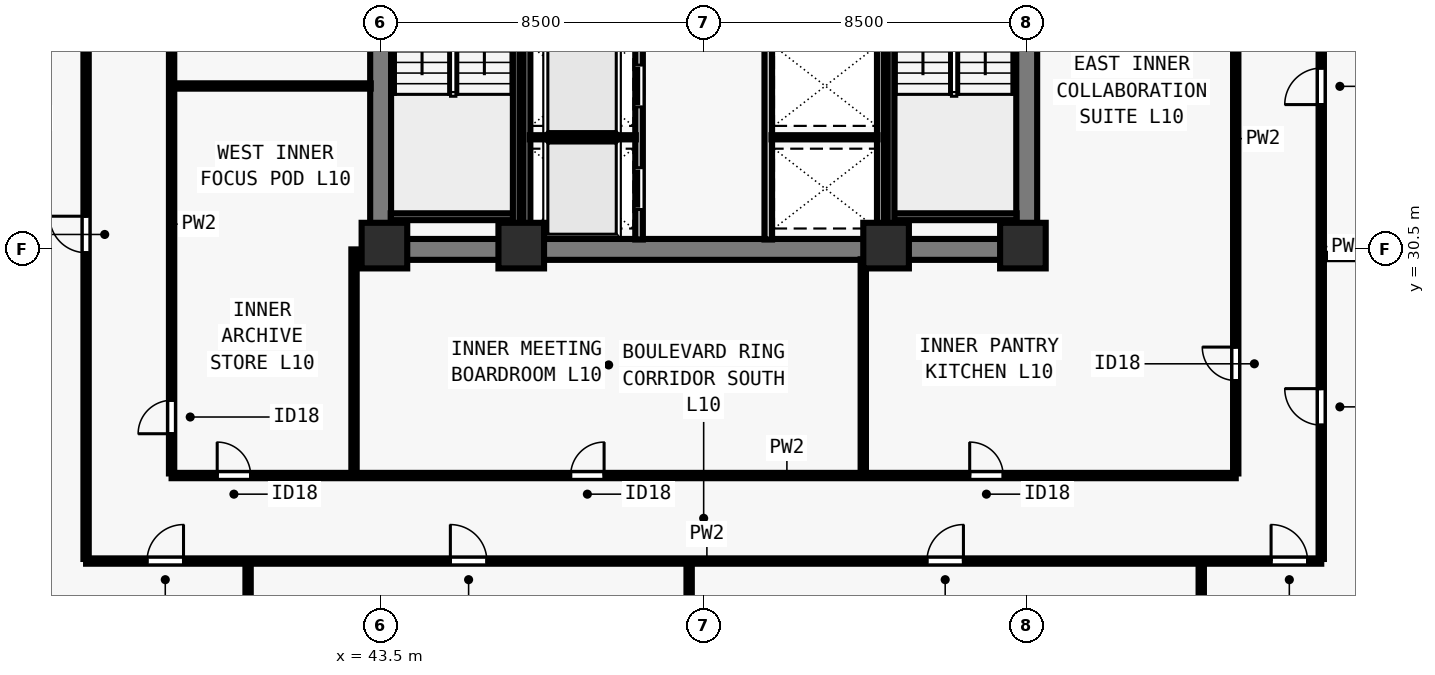
"""IFC4 building model, lengths in metres.
Left out: names, types, materials, properties, quantities, classifications, styles, units other than length and angle.
Written with IfcOpenShell. Run it as: python <this file> out.ifc"""

import sys

from ifc_helpers import new_model, si_unit, direction, frame, frame_2d, origin, origin_2d, place, context, subcontext, project, spatial, rectangle, extrude, element, fill, save


model = new_model("IFC4")
c1 = context("Model", 3, precision=1e-05, world=origin(), true_north=direction((0.0, 1.0)))
c2 = subcontext(c1, "Body", "Model", "MODEL_VIEW")
j1 = project(units=[si_unit("LENGTHUNIT", "METRE"), si_unit("PLANEANGLEUNIT", "RADIAN")], contexts=[c1])
p1 = place(None, origin())
s1 = spatial("IfcSite", under=j1, at=p1, CompositionType="ELEMENT")
p2 = place(p1, origin())
s2 = spatial("IfcBuilding", under=s1, at=p2, CompositionType="ELEMENT")
p3 = place(p2, frame((0.0, 0.0, 41.0)))
s3 = spatial("IfcBuildingStorey", under=s2, at=p3, CompositionType="ELEMENT", Elevation=41.0)
for number, where, z_axis, x_axis in (
    (1, (43.6, 30.6, 0.0), (0.0, 0.0, 1.0), (1.0, 0.0, 0.0)),
    (2, (47.2, 30.6, 0.0), (0.0, 0.0, 1.0), (1.0, 0.0, 0.0)),
    (3, (56.8, 30.6, 0.0), (0.0, 0.0, 1.0), (1.0, 0.0, 0.0)),
    (4, (60.4, 30.6, 0.0), (0.0, 0.0, 1.0), (1.0, 0.0, 0.0)),
):
    element("IfcColumn", number, at=place(p3, frame(where, z_axis=z_axis, x_axis=x_axis)), inside=s3, PredefinedType="COLUMN", context=c2, shape_type="SweptSolid", body=[
        extrude(rectangle(XDim=1.2, YDim=1.2, at=origin_2d()), origin(), (0.0, 0.0, 1.0), 3.5),
    ])
p4 = place(p3, frame((43.225, 30.5, 0.0), z_axis=(0.0, 0.0, 1.0), x_axis=(1.0, 0.0, 0.0)))
e5 = element("IfcWall", 5, at=p4, inside=s3, PredefinedType="SHEAR", context=c2, shape_type="SweptSolid", body=[
    extrude(rectangle(XDim=17.55, YDim=0.55, at=frame_2d((8.775, 0.0))), origin(), (0.0, 0.0, 1.0), 3.28),
])
for number, where, z_axis, x_axis in (
    (6, (43.5, 30.765, 0.0), (0.0, 0.0, 1.0), (0.0, 1.0, 0.0)),
    (7, (60.5, 30.765, 0.0), (0.0, 0.0, 1.0), (0.0, 1.0, 0.0)),
):
    element("IfcWall", number, at=place(p3, frame(where, z_axis=z_axis, x_axis=x_axis)), inside=s3, PredefinedType="SHEAR", context=c2, shape_type="SweptSolid", body=[
        extrude(rectangle(XDim=7.985, YDim=0.55, at=frame_2d((3.993, 0.0))), origin(), (0.0, 0.0, 1.0), 3.28),
    ])
p5 = place(p3, frame((50.3, 30.76, 0.0), z_axis=(0.0, 0.0, 1.0), x_axis=(0.0, 1.0, 0.0)))
e8 = element("IfcWall", 8, at=p5, inside=s3, PredefinedType="SOLIDWALL", context=c2, shape_type="SweptSolid", body=[
    extrude(rectangle(XDim=7.855, YDim=0.2, at=frame_2d((3.927, 0.0))), origin(), (0.0, 0.0, 1.0), 3.28),
])
p6 = place(p5, frame((0.79, 0.0, 0.0)))
e9 = element("IfcOpeningElement", 9, at=p6, cuts=e8, PredefinedType="OPENING", context=c2, shape_type="SweptSolid", body=[
    extrude(rectangle(XDim=1.1, YDim=2.2, at=frame_2d((0.55, 1.1))), frame((0.0, 0.11, 0.0), z_axis=(0.0, -1.0, 0.0), x_axis=(1.0, 0.0, 0.0)), (0.0, 0.0, 1.0), 0.22),
])
p7 = place(p5, frame((3.49, 0.0, 0.0)))
e10 = element("IfcOpeningElement", 10, at=p7, cuts=e8, PredefinedType="OPENING", context=c2, shape_type="SweptSolid", body=[
    extrude(rectangle(XDim=1.1, YDim=2.2, at=frame_2d((0.55, 1.1))), frame((0.0, 0.11, 0.0), z_axis=(0.0, -1.0, 0.0), x_axis=(1.0, 0.0, 0.0)), (0.0, 0.0, 1.0), 0.22),
])
p8 = place(p5, frame((6.19, 0.0, 0.0)))
e11 = element("IfcOpeningElement", 11, at=p8, cuts=e8, PredefinedType="OPENING", context=c2, shape_type="SweptSolid", body=[
    extrude(rectangle(XDim=1.1, YDim=2.2, at=frame_2d((0.55, 1.1))), frame((0.0, 0.11, 0.0), z_axis=(0.0, -1.0, 0.0), x_axis=(1.0, 0.0, 0.0)), (0.0, 0.0, 1.0), 0.22),
])
p9 = place(p3, frame((53.7, 30.76, 0.0), z_axis=(0.0, 0.0, 1.0), x_axis=(0.0, 1.0, 0.0)))
e12 = element("IfcWall", 12, at=p9, inside=s3, PredefinedType="SOLIDWALL", context=c2, shape_type="SweptSolid", body=[
    extrude(rectangle(XDim=7.855, YDim=0.2, at=frame_2d((3.927, 0.0))), origin(), (0.0, 0.0, 1.0), 3.28),
])
p10 = place(p3, frame((47.35, 30.76, 0.0), z_axis=(0.0, 0.0, 1.0), x_axis=(0.0, 1.0, 0.0)))
e13 = element("IfcWall", 13, at=p10, inside=s3, PredefinedType="SOLIDWALL", context=c2, shape_type="SweptSolid", body=[
    extrude(rectangle(XDim=7.855, YDim=0.18, at=frame_2d((3.927, 0.0))), origin(), (0.0, 0.0, 1.0), 3.28),
])
p11 = place(p3, frame((47.425, 33.45, 0.0), z_axis=(0.0, 0.0, 1.0), x_axis=(1.0, 0.0, 0.0)))
e14 = element("IfcWall", 14, at=p11, inside=s3, PredefinedType="PARTITIONING", context=c2, shape_type="SweptSolid", body=[
    extrude(rectangle(XDim=2.79, YDim=0.11, at=frame_2d((1.395, 0.0))), origin(), (0.0, 0.0, 1.0), 3.28),
])
p12 = place(p3, frame((56.65, 30.76, 0.0), z_axis=(0.0, 0.0, 1.0), x_axis=(0.0, 1.0, 0.0)))
e15 = element("IfcWall", 15, at=p12, inside=s3, PredefinedType="SOLIDWALL", context=c2, shape_type="SweptSolid", body=[
    extrude(rectangle(XDim=7.855, YDim=0.18, at=frame_2d((3.927, 0.0))), origin(), (0.0, 0.0, 1.0), 3.28),
])
p13 = place(p3, frame((53.785, 33.45, 0.0), z_axis=(0.0, 0.0, 1.0), x_axis=(1.0, 0.0, 0.0)))
e16 = element("IfcWall", 16, at=p13, inside=s3, PredefinedType="PARTITIONING", context=c2, shape_type="SweptSolid", body=[
    extrude(rectangle(XDim=2.79, YDim=0.11, at=frame_2d((1.395, 0.0))), origin(), (0.0, 0.0, 1.0), 3.28),
])
p14 = place(p3, frame((35.75, 22.3, 0.0), z_axis=(0.0, 0.0, 1.0), x_axis=(1.0, 0.0, 0.0)))
e17 = element("IfcWall", 17, at=p14, inside=s3, PredefinedType="PARTITIONING", context=c2, shape_type="SweptSolid", body=[
    extrude(rectangle(XDim=32.5, YDim=0.14, at=frame_2d((16.25, 0.0))), origin(), (0.0, 0.0, 1.0), 3.28),
])
p15 = place(p14, frame((1.604, 0.0, 0.0)))
e18 = element("IfcOpeningElement", 18, at=p15, cuts=e17, PredefinedType="OPENING", context=c2, shape_type="SweptSolid", body=[
    extrude(rectangle(XDim=0.96, YDim=2.12, at=frame_2d((0.48, 1.06))), frame((0.0, 0.08, 0.0), z_axis=(0.0, -1.0, 0.0), x_axis=(1.0, 0.0, 0.0)), (0.0, 0.0, 1.0), 0.16),
])
p16 = place(p14, frame((9.585, 0.0, 0.0)))
e19 = element("IfcOpeningElement", 19, at=p16, cuts=e17, PredefinedType="OPENING", context=c2, shape_type="SweptSolid", body=[
    extrude(rectangle(XDim=0.96, YDim=2.12, at=frame_2d((0.48, 1.06))), frame((0.0, 0.08, 0.0), z_axis=(0.0, -1.0, 0.0), x_axis=(1.0, 0.0, 0.0)), (0.0, 0.0, 1.0), 0.16),
])
p17 = place(p14, frame((22.125, 0.0, 0.0)))
e20 = element("IfcOpeningElement", 20, at=p17, cuts=e17, PredefinedType="OPENING", context=c2, shape_type="SweptSolid", body=[
    extrude(rectangle(XDim=0.96, YDim=2.12, at=frame_2d((0.48, 1.06))), frame((0.0, 0.08, 0.0), z_axis=(0.0, -1.0, 0.0), x_axis=(1.0, 0.0, 0.0)), (0.0, 0.0, 1.0), 0.16),
])
p18 = place(p14, frame((31.18, 0.0, 0.0)))
e21 = element("IfcOpeningElement", 21, at=p18, cuts=e17, PredefinedType="OPENING", context=c2, shape_type="SweptSolid", body=[
    extrude(rectangle(XDim=0.96, YDim=2.12, at=frame_2d((0.48, 1.06))), frame((0.0, 0.08, 0.0), z_axis=(0.0, -1.0, 0.0), x_axis=(1.0, 0.0, 0.0)), (0.0, 0.0, 1.0), 0.16),
])
p19 = place(p3, frame((35.75, 22.355, 0.0), z_axis=(0.0, 0.0, 1.0), x_axis=(0.0, 1.0, 0.0)))
e22 = element("IfcWall", 22, at=p19, inside=s3, PredefinedType="PARTITIONING", context=c2, shape_type="SweptSolid", body=[
    extrude(rectangle(XDim=33.29, YDim=0.14, at=frame_2d((16.645, 0.0))), origin(), (0.0, 0.0, 1.0), 3.28),
])
p20 = place(p19, frame((8.058, 0.0, 0.0)))
e23 = element("IfcOpeningElement", 23, at=p20, cuts=e22, PredefinedType="OPENING", context=c2, shape_type="SweptSolid", body=[
    extrude(rectangle(XDim=0.96, YDim=2.12, at=frame_2d((0.48, 1.06))), frame((0.0, 0.08, 0.0), z_axis=(0.0, -1.0, 0.0), x_axis=(1.0, 0.0, 0.0)), (0.0, 0.0, 1.0), 0.16),
])
p21 = place(p19, frame((24.658, 0.0, 0.0)))
e24 = element("IfcOpeningElement", 24, at=p21, cuts=e22, PredefinedType="OPENING", context=c2, shape_type="SweptSolid", body=[
    extrude(rectangle(XDim=0.96, YDim=2.12, at=frame_2d((0.48, 1.06))), frame((0.0, 0.08, 0.0), z_axis=(0.0, -1.0, 0.0), x_axis=(1.0, 0.0, 0.0)), (0.0, 0.0, 1.0), 0.16),
])
p22 = place(p3, frame((68.25, 22.355, 0.0), z_axis=(0.0, 0.0, 1.0), x_axis=(0.0, 1.0, 0.0)))
e25 = element("IfcWall", 25, at=p22, inside=s3, PredefinedType="PARTITIONING", context=c2, shape_type="SweptSolid", body=[
    extrude(rectangle(XDim=33.29, YDim=0.14, at=frame_2d((16.645, 0.0))), origin(), (0.0, 0.0, 1.0), 3.28),
])
p23 = place(p22, frame((3.522, 0.0, 0.0)))
e26 = element("IfcOpeningElement", 26, at=p23, cuts=e25, PredefinedType="OPENING", context=c2, shape_type="SweptSolid", body=[
    extrude(rectangle(XDim=0.96, YDim=2.12, at=frame_2d((0.48, 1.06))), frame((0.0, 0.08, 0.0), z_axis=(0.0, -1.0, 0.0), x_axis=(1.0, 0.0, 0.0)), (0.0, 0.0, 1.0), 0.16),
])
p24 = place(p22, frame((11.956, 0.0, 0.0)))
e27 = element("IfcOpeningElement", 27, at=p24, cuts=e25, PredefinedType="OPENING", context=c2, shape_type="SweptSolid", body=[
    extrude(rectangle(XDim=0.96, YDim=2.12, at=frame_2d((0.48, 1.06))), frame((0.0, 0.08, 0.0), z_axis=(0.0, -1.0, 0.0), x_axis=(1.0, 0.0, 0.0)), (0.0, 0.0, 1.0), 0.16),
])
p25 = place(p22, frame((20.256, 0.0, 0.0)))
e28 = element("IfcOpeningElement", 28, at=p25, cuts=e25, PredefinedType="OPENING", context=c2, shape_type="SweptSolid", body=[
    extrude(rectangle(XDim=0.96, YDim=2.12, at=frame_2d((0.48, 1.06))), frame((0.0, 0.08, 0.0), z_axis=(0.0, -1.0, 0.0), x_axis=(1.0, 0.0, 0.0)), (0.0, 0.0, 1.0), 0.16),
])
p26 = place(p22, frame((28.422, 0.0, 0.0)))
e29 = element("IfcOpeningElement", 29, at=p26, cuts=e25, PredefinedType="OPENING", context=c2, shape_type="SweptSolid", body=[
    extrude(rectangle(XDim=0.96, YDim=2.12, at=frame_2d((0.48, 1.06))), frame((0.0, 0.08, 0.0), z_axis=(0.0, -1.0, 0.0), x_axis=(1.0, 0.0, 0.0)), (0.0, 0.0, 1.0), 0.16),
])
p27 = place(p3, frame((38.0, 24.55, 0.0), z_axis=(0.0, 0.0, 1.0), x_axis=(1.0, 0.0, 0.0)))
e30 = element("IfcWall", 30, at=p27, inside=s3, PredefinedType="PARTITIONING", context=c2, shape_type="SweptSolid", body=[
    extrude(rectangle(XDim=28.0, YDim=0.14, at=frame_2d((14.0, 0.0))), origin(), (0.0, 0.0, 1.0), 3.28),
])
p28 = place(p27, frame((1.2, 0.0, 0.0)))
e31 = element("IfcOpeningElement", 31, at=p28, cuts=e30, PredefinedType="OPENING", context=c2, shape_type="SweptSolid", body=[
    extrude(rectangle(XDim=0.88, YDim=2.1, at=frame_2d((0.44, 1.05))), frame((0.0, 0.08, 0.0), z_axis=(0.0, -1.0, 0.0), x_axis=(1.0, 0.0, 0.0)), (0.0, 0.0, 1.0), 0.16),
])
p29 = place(p27, frame((10.5, 0.0, 0.0)))
e32 = element("IfcOpeningElement", 32, at=p29, cuts=e30, PredefinedType="OPENING", context=c2, shape_type="SweptSolid", body=[
    extrude(rectangle(XDim=0.88, YDim=2.1, at=frame_2d((0.44, 1.05))), frame((0.0, 0.08, 0.0), z_axis=(0.0, -1.0, 0.0), x_axis=(1.0, 0.0, 0.0)), (0.0, 0.0, 1.0), 0.16),
])
p30 = place(p27, frame((21.0, 0.0, 0.0)))
e33 = element("IfcOpeningElement", 33, at=p30, cuts=e30, PredefinedType="OPENING", context=c2, shape_type="SweptSolid", body=[
    extrude(rectangle(XDim=0.88, YDim=2.1, at=frame_2d((0.44, 1.05))), frame((0.0, 0.08, 0.0), z_axis=(0.0, -1.0, 0.0), x_axis=(1.0, 0.0, 0.0)), (0.0, 0.0, 1.0), 0.16),
])
p31 = place(p3, frame((38.0, 24.605, 0.0), z_axis=(0.0, 0.0, 1.0), x_axis=(0.0, 1.0, 0.0)))
e34 = element("IfcWall", 34, at=p31, inside=s3, PredefinedType="PARTITIONING", context=c2, shape_type="SweptSolid", body=[
    extrude(rectangle(XDim=14.145, YDim=0.14, at=frame_2d((7.073, 0.0))), origin(), (0.0, 0.0, 1.0), 3.28),
])
p32 = place(p31, frame((1.045, 0.0, 0.0)))
e35 = element("IfcOpeningElement", 35, at=p32, cuts=e34, PredefinedType="OPENING", context=c2, shape_type="SweptSolid", body=[
    extrude(rectangle(XDim=0.88, YDim=2.1, at=frame_2d((0.44, 1.05))), frame((0.0, 0.08, 0.0), z_axis=(0.0, -1.0, 0.0), x_axis=(1.0, 0.0, 0.0)), (0.0, 0.0, 1.0), 0.16),
])
p33 = place(p31, frame((11.195, 0.0, 0.0)))
e36 = element("IfcOpeningElement", 36, at=p33, cuts=e34, PredefinedType="OPENING", context=c2, shape_type="SweptSolid", body=[
    extrude(rectangle(XDim=0.88, YDim=2.1, at=frame_2d((0.44, 1.05))), frame((0.0, 0.08, 0.0), z_axis=(0.0, -1.0, 0.0), x_axis=(1.0, 0.0, 0.0)), (0.0, 0.0, 1.0), 0.16),
])
p34 = place(p3, frame((66.0, 24.605, 0.0), z_axis=(0.0, 0.0, 1.0), x_axis=(0.0, 1.0, 0.0)))
e37 = element("IfcWall", 37, at=p34, inside=s3, PredefinedType="PARTITIONING", context=c2, shape_type="SweptSolid", body=[
    extrude(rectangle(XDim=14.145, YDim=0.14, at=frame_2d((7.073, 0.0))), origin(), (0.0, 0.0, 1.0), 3.28),
])
p35 = place(p34, frame((2.445, 0.0, 0.0)))
e38 = element("IfcOpeningElement", 38, at=p35, cuts=e37, PredefinedType="OPENING", context=c2, shape_type="SweptSolid", body=[
    extrude(rectangle(XDim=0.88, YDim=2.1, at=frame_2d((0.44, 1.05))), frame((0.0, 0.08, 0.0), z_axis=(0.0, -1.0, 0.0), x_axis=(1.0, 0.0, 0.0)), (0.0, 0.0, 1.0), 0.16),
])
p36 = place(p3, frame((42.8, 24.605, 0.0), z_axis=(0.0, 0.0, 1.0), x_axis=(0.0, 1.0, 0.0)))
e39 = element("IfcWall", 39, at=p36, inside=s3, PredefinedType="PARTITIONING", context=c2, shape_type="SweptSolid", body=[
    extrude(rectangle(XDim=5.895, YDim=0.14, at=frame_2d((2.948, 0.0))), origin(), (0.0, 0.0, 1.0), 2.439),
])
p37 = place(p3, frame((56.2, 24.605, 0.0), z_axis=(0.0, 0.0, 1.0), x_axis=(0.0, 1.0, 0.0)))
e40 = element("IfcWall", 40, at=p37, inside=s3, PredefinedType="PARTITIONING", context=c2, shape_type="SweptSolid", body=[
    extrude(rectangle(XDim=5.635, YDim=0.14, at=frame_2d((2.817, 0.0))), origin(), (0.0, 0.0, 1.0), 2.849),
])
p38 = place(p3, frame((38.055, 34.8, 0.0), z_axis=(0.0, 0.0, 1.0), x_axis=(1.0, 0.0, 0.0)))
e41 = element("IfcWall", 41, at=p38, inside=s3, PredefinedType="PARTITIONING", context=c2, shape_type="SweptSolid", body=[
    extrude(rectangle(XDim=5.185, YDim=0.14, at=frame_2d((2.593, 0.0))), origin(), (0.0, 0.0, 1.0), 3.28),
])
p39 = place(p3, frame((40.012, 13.92, 0.0), z_axis=(0.0, 0.0, 1.0), x_axis=(0.0, 1.0, 0.0)))
e42 = element("IfcWall", 42, at=p39, inside=s3, PredefinedType="PARTITIONING", context=c2, shape_type="SweptSolid", body=[
    extrude(rectangle(XDim=8.28, YDim=0.14, at=frame_2d((4.14, 0.0))), origin(), (0.0, 0.0, 1.0), 3.28),
])
p40 = place(p3, frame((51.617, 13.92, 0.0), z_axis=(0.0, 0.0, 1.0), x_axis=(0.0, 1.0, 0.0)))
e43 = element("IfcWall", 43, at=p40, inside=s3, PredefinedType="PARTITIONING", context=c2, shape_type="SweptSolid", body=[
    extrude(rectangle(XDim=8.28, YDim=0.14, at=frame_2d((4.14, 0.0))), origin(), (0.0, 0.0, 1.0), 2.849),
])
p41 = place(p3, frame((65.093, 13.92, 0.0), z_axis=(0.0, 0.0, 1.0), x_axis=(0.0, 1.0, 0.0)))
e44 = element("IfcWall", 44, at=p41, inside=s3, PredefinedType="PARTITIONING", context=c2, shape_type="SweptSolid", body=[
    extrude(rectangle(XDim=8.28, YDim=0.14, at=frame_2d((4.14, 0.0))), origin(), (0.0, 0.0, 1.0), 3.28),
])
p42 = place(p3, frame((68.35, 30.313, 0.0), z_axis=(0.0, 0.0, 1.0), x_axis=(1.0, 0.0, 0.0)))
e45 = element("IfcWall", 45, at=p42, inside=s3, PredefinedType="PARTITIONING", context=c2, shape_type="SweptSolid", body=[
    extrude(rectangle(XDim=8.73, YDim=0.14, at=frame_2d((4.365, 0.0))), origin(), (0.0, 0.0, 1.0), 3.28),
])
p43 = place(p3, frame((43.765, 31.36, 0.0), z_axis=(0.0, 0.0, 1.0), x_axis=(1.0, 0.0, 0.0)))
e46 = element("IfcWall", 46, at=p43, inside=s3, PredefinedType="SOLIDWALL", context=c2, shape_type="SweptSolid", body=[
    extrude(rectangle(XDim=3.23, YDim=0.18, at=frame_2d((1.615, 0.0))), origin(), (0.0, 0.0, 1.0), 3.28),
])
p44 = place(p3, frame((47.07, 38.78, 0.0), z_axis=(0.0, 0.0, 1.0), x_axis=(0.0, -1.0, 0.0)))
e47 = element("IfcWall", 47, at=p44, inside=s3, PredefinedType="SOLIDWALL", context=c2, shape_type="SweptSolid", body=[
    extrude(rectangle(XDim=8.017, YDim=0.18, at=frame_2d((4.009, 0.0))), origin(), (0.0, 0.0, 1.0), 3.28),
])
p45 = place(p3, frame((57.005, 31.36, 0.0), z_axis=(0.0, 0.0, 1.0), x_axis=(1.0, 0.0, 0.0)))
e48 = element("IfcWall", 48, at=p45, inside=s3, PredefinedType="SOLIDWALL", context=c2, shape_type="SweptSolid", body=[
    extrude(rectangle(XDim=3.23, YDim=0.18, at=frame_2d((1.615, 0.0))), origin(), (0.0, 0.0, 1.0), 3.28),
])
p46 = place(p3, frame((56.93, 38.78, 0.0), z_axis=(0.0, 0.0, 1.0), x_axis=(0.0, -1.0, 0.0)))
e49 = element("IfcWall", 49, at=p46, inside=s3, PredefinedType="SOLIDWALL", context=c2, shape_type="SweptSolid", body=[
    extrude(rectangle(XDim=8.017, YDim=0.18, at=frame_2d((4.009, 0.0))), origin(), (0.0, 0.0, 1.0), 3.28),
])
p47 = place(p6, origin())
e50 = element("IfcDoor", 50, at=p47, inside=s3, OperationType="SLIDING_TO_LEFT", PredefinedType="DOOR", context=c2, shape_type="SweptSolid", body=[
    extrude(rectangle(XDim=1.1, YDim=2.2, at=frame_2d((0.55, 1.1))), frame((0.0, 0.025, 0.0), z_axis=(0.0, -1.0, 0.0), x_axis=(1.0, 0.0, 0.0)), (0.0, 0.0, 1.0), 0.05),
])
fill(e9, e50)
p48 = place(p7, origin())
e51 = element("IfcDoor", 51, at=p48, inside=s3, OperationType="SLIDING_TO_LEFT", PredefinedType="DOOR", context=c2, shape_type="SweptSolid", body=[
    extrude(rectangle(XDim=1.1, YDim=2.2, at=frame_2d((0.55, 1.1))), frame((0.0, 0.025, 0.0), z_axis=(0.0, -1.0, 0.0), x_axis=(1.0, 0.0, 0.0)), (0.0, 0.0, 1.0), 0.05),
])
fill(e10, e51)
p49 = place(p28, origin())
e52 = element("IfcDoor", 52, at=p49, inside=s3, OperationType="SINGLE_SWING_LEFT", PredefinedType="DOOR", context=c2, shape_type="SweptSolid", body=[
    extrude(rectangle(XDim=0.88, YDim=2.1, at=frame_2d((0.44, 1.05))), frame((0.0, 0.025, 0.0), z_axis=(0.0, -1.0, 0.0), x_axis=(1.0, 0.0, 0.0)), (0.0, 0.0, 1.0), 0.05),
])
fill(e31, e52)
p50 = place(p29, origin())
e53 = element("IfcDoor", 53, at=p50, inside=s3, OperationType="SINGLE_SWING_RIGHT", PredefinedType="DOOR", context=c2, shape_type="SweptSolid", body=[
    extrude(rectangle(XDim=0.88, YDim=2.1, at=frame_2d((0.44, 1.05))), frame((0.0, 0.025, 0.0), z_axis=(0.0, -1.0, 0.0), x_axis=(1.0, 0.0, 0.0)), (0.0, 0.0, 1.0), 0.05),
])
fill(e32, e53)
p51 = place(p30, origin())
e54 = element("IfcDoor", 54, at=p51, inside=s3, OperationType="SINGLE_SWING_LEFT", PredefinedType="DOOR", context=c2, shape_type="SweptSolid", body=[
    extrude(rectangle(XDim=0.88, YDim=2.1, at=frame_2d((0.44, 1.05))), frame((0.0, 0.025, 0.0), z_axis=(0.0, -1.0, 0.0), x_axis=(1.0, 0.0, 0.0)), (0.0, 0.0, 1.0), 0.05),
])
fill(e33, e54)
p52 = place(p32, origin())
e55 = element("IfcDoor", 55, at=p52, inside=s3, OperationType="SINGLE_SWING_LEFT", PredefinedType="DOOR", context=c2, shape_type="SweptSolid", body=[
    extrude(rectangle(XDim=0.88, YDim=2.1, at=frame_2d((0.44, 1.05))), frame((0.0, 0.025, 0.0), z_axis=(0.0, -1.0, 0.0), x_axis=(1.0, 0.0, 0.0)), (0.0, 0.0, 1.0), 0.05),
])
fill(e35, e55)
p53 = place(p35, origin())
e56 = element("IfcDoor", 56, at=p53, inside=s3, OperationType="SINGLE_SWING_RIGHT", PredefinedType="DOOR", context=c2, shape_type="SweptSolid", body=[
    extrude(rectangle(XDim=0.88, YDim=2.1, at=frame_2d((0.44, 1.05))), frame((0.0, 0.025, 0.0), z_axis=(0.0, -1.0, 0.0), x_axis=(1.0, 0.0, 0.0)), (0.0, 0.0, 1.0), 0.05),
])
fill(e38, e56)
p54 = place(p15, origin())
e57 = element("IfcDoor", 57, at=p54, inside=s3, OperationType="SINGLE_SWING_RIGHT", PredefinedType="DOOR", context=c2, shape_type="SweptSolid", body=[
    extrude(rectangle(XDim=0.96, YDim=2.12, at=frame_2d((0.48, 1.06))), frame((0.0, 0.025, 0.0), z_axis=(0.0, -1.0, 0.0), x_axis=(1.0, 0.0, 0.0)), (0.0, 0.0, 1.0), 0.05),
])
fill(e18, e57)
p55 = place(p16, origin())
e58 = element("IfcDoor", 58, at=p55, inside=s3, OperationType="SINGLE_SWING_LEFT", PredefinedType="DOOR", context=c2, shape_type="SweptSolid", body=[
    extrude(rectangle(XDim=0.96, YDim=2.12, at=frame_2d((0.48, 1.06))), frame((0.0, 0.025, 0.0), z_axis=(0.0, -1.0, 0.0), x_axis=(1.0, 0.0, 0.0)), (0.0, 0.0, 1.0), 0.05),
])
fill(e19, e58)
p56 = place(p17, origin())
e59 = element("IfcDoor", 59, at=p56, inside=s3, OperationType="SINGLE_SWING_RIGHT", PredefinedType="DOOR", context=c2, shape_type="SweptSolid", body=[
    extrude(rectangle(XDim=0.96, YDim=2.12, at=frame_2d((0.48, 1.06))), frame((0.0, 0.025, 0.0), z_axis=(0.0, -1.0, 0.0), x_axis=(1.0, 0.0, 0.0)), (0.0, 0.0, 1.0), 0.05),
])
fill(e20, e59)
p57 = place(p18, origin())
e60 = element("IfcDoor", 60, at=p57, inside=s3, OperationType="SINGLE_SWING_LEFT", PredefinedType="DOOR", context=c2, shape_type="SweptSolid", body=[
    extrude(rectangle(XDim=0.96, YDim=2.12, at=frame_2d((0.48, 1.06))), frame((0.0, 0.025, 0.0), z_axis=(0.0, -1.0, 0.0), x_axis=(1.0, 0.0, 0.0)), (0.0, 0.0, 1.0), 0.05),
])
fill(e21, e60)
p58 = place(p20, origin())
e61 = element("IfcDoor", 61, at=p58, inside=s3, OperationType="SINGLE_SWING_RIGHT", PredefinedType="DOOR", context=c2, shape_type="SweptSolid", body=[
    extrude(rectangle(XDim=0.96, YDim=2.12, at=frame_2d((0.48, 1.06))), frame((0.0, 0.025, 0.0), z_axis=(0.0, -1.0, 0.0), x_axis=(1.0, 0.0, 0.0)), (0.0, 0.0, 1.0), 0.05),
])
fill(e23, e61)
p59 = place(p23, origin())
e62 = element("IfcDoor", 62, at=p59, inside=s3, OperationType="SINGLE_SWING_RIGHT", PredefinedType="DOOR", context=c2, shape_type="SweptSolid", body=[
    extrude(rectangle(XDim=0.96, YDim=2.12, at=frame_2d((0.48, 1.06))), frame((0.0, 0.025, 0.0), z_axis=(0.0, -1.0, 0.0), x_axis=(1.0, 0.0, 0.0)), (0.0, 0.0, 1.0), 0.05),
])
fill(e26, e62)
p60 = place(p24, origin())
e63 = element("IfcDoor", 63, at=p60, inside=s3, OperationType="SINGLE_SWING_LEFT", PredefinedType="DOOR", context=c2, shape_type="SweptSolid", body=[
    extrude(rectangle(XDim=0.96, YDim=2.12, at=frame_2d((0.48, 1.06))), frame((0.0, 0.025, 0.0), z_axis=(0.0, -1.0, 0.0), x_axis=(1.0, 0.0, 0.0)), (0.0, 0.0, 1.0), 0.05),
])
fill(e27, e63)
save(model, sys.argv[1])
